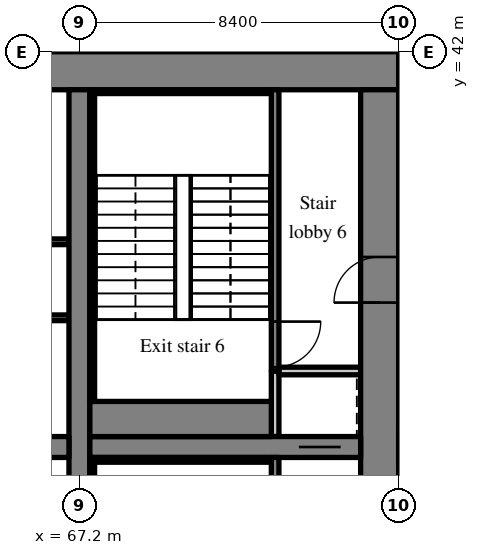
"""IFC4 building model, lengths in metres.
Left out: names, types, materials, properties, quantities, classifications, styles, units other than length and angle.
Written with IfcOpenShell. Run it as: python <this file> out.ifc"""

import sys

from ifc_helpers import new_model, si_unit, direction, frame, frame_2d, origin, place, context, subcontext, project, spatial, rectangle, extrude, source, transform, mapped, element, fill, save


model = new_model("IFC4")
c1 = context("Model", 3, precision=1e-05, world=origin(), true_north=direction((0.0, 1.0)))
c2 = subcontext(c1, "Body", "Model", "MODEL_VIEW")
j1 = project(units=[si_unit("LENGTHUNIT", "METRE"), si_unit("PLANEANGLEUNIT", "RADIAN")], contexts=[c1])
p1 = place(None, origin())
s1 = spatial("IfcSite", under=j1, at=p1, CompositionType="ELEMENT")
p2 = place(p1, origin())
s2 = spatial("IfcBuilding", under=s1, at=p2, CompositionType="ELEMENT")
p3 = place(p2, frame((0.0, 0.0, 81.0)))
s3 = spatial("IfcBuildingStorey", under=s2, at=p3, CompositionType="ELEMENT", Elevation=81.0)
m1 = source(origin(), c2, "Body", "SweptSolid", [
    extrude(rectangle(XDim=50.4, YDim=1.0, at=frame_2d((25.2, 0.0))), origin(), (0.0, 0.0, 1.0), 5.12),
])
p4 = place(p3, frame((25.2, 41.5, 0.0), z_axis=(0.0, 0.0, 1.0), x_axis=(1.0, 0.0, 0.0)))
e1 = element("IfcWall", 1, at=p4, inside=s3, PredefinedType="SHEAR", context=c2, shape_type="MappedRepresentation", body=[
    mapped(m1, transform((0.0, 0.0, 0.0), scale=1.0)),
])
m2 = source(origin(), c2, "Body", "SweptSolid", [
    extrude(rectangle(XDim=18.0, YDim=1.0, at=frame_2d((9.0, 0.0))), origin(), (0.0, 0.0, 1.0), 5.12),
])
p5 = place(p3, frame((75.1, 23.0, 0.0), z_axis=(0.0, 0.0, 1.0), x_axis=(0.0, 1.0, 0.0)))
e2 = element("IfcWall", 2, at=p5, inside=s3, PredefinedType="SHEAR", context=c2, shape_type="MappedRepresentation", body=[
    mapped(m2, transform((0.0, 0.0, 0.0), scale=1.0)),
])
m3 = source(origin(), c2, "Body", "SweptSolid", [
    extrude(rectangle(XDim=1.0, YDim=2.1, at=frame_2d((0.5, 1.05))), frame((0.0, 0.51, 0.0), z_axis=(0.0, -1.0, 0.0), x_axis=(1.0, 0.0, 0.0)), (0.0, 0.0, 1.0), 1.02),
])
p6 = place(p5, frame((2.5, 0.0, 0.0)))
e3 = element("IfcOpeningElement", 3, at=p6, cuts=e2, PredefinedType="OPENING", context=c2, shape_type="MappedRepresentation", body=[
    mapped(m3, transform((0.0, 0.0, 0.0), scale=1.0)),
])
m4 = source(origin(), c2, "Body", "SweptSolid", [
    extrude(rectangle(XDim=1.2, YDim=2.1, at=frame_2d((0.6, 1.05))), frame((0.0, 0.51, 0.0), z_axis=(0.0, -1.0, 0.0), x_axis=(1.0, 0.0, 0.0)), (0.0, 0.0, 1.0), 1.02),
])
p7 = place(p5, frame((12.4, 0.0, 0.0)))
e4 = element("IfcOpeningElement", 4, at=p7, cuts=e2, PredefinedType="OPENING", context=c2, shape_type="MappedRepresentation", body=[
    mapped(m4, transform((0.0, 0.0, 0.0), scale=1.0)),
])
m5 = source(origin(), c2, "Body", "SweptSolid", [
    extrude(rectangle(XDim=18.0, YDim=0.55, at=frame_2d((9.0, 0.0))), origin(), (0.0, 0.0, 1.0), 5.12),
])
p8 = place(p3, frame((67.2, 23.0, 0.0), z_axis=(0.0, 0.0, 1.0), x_axis=(0.0, 1.0, 0.0)))
e5 = element("IfcWall", 5, at=p8, inside=s3, PredefinedType="SHEAR", context=c2, shape_type="MappedRepresentation", body=[
    mapped(m5, transform((0.0, 0.0, 0.0), scale=1.0)),
])
m6 = source(origin(), c2, "Body", "SweptSolid", [
    extrude(rectangle(XDim=16.25, YDim=0.55, at=frame_2d((8.125, 0.0))), origin(), (0.0, 0.0, 1.0), 5.12),
])
p9 = place(p3, frame((50.675, 31.6, 0.0), z_axis=(0.0, 0.0, 1.0), x_axis=(1.0, 0.0, 0.0)))
e6 = element("IfcWall", 6, at=p9, inside=s3, PredefinedType="SHEAR", context=c2, shape_type="MappedRepresentation", body=[
    mapped(m6, transform((0.0, 0.0, 0.0), scale=1.0)),
])
m7 = source(origin(), c2, "Body", "SweptSolid", [
    extrude(rectangle(XDim=1.0, YDim=2.1, at=frame_2d((0.5, 1.05))), frame((0.0, 0.285, 0.0), z_axis=(0.0, -1.0, 0.0), x_axis=(1.0, 0.0, 0.0)), (0.0, 0.0, 1.0), 0.57),
])
p10 = place(p9, frame((0.562, 0.0, 0.0)))
e7 = element("IfcOpeningElement", 7, at=p10, cuts=e6, PredefinedType="OPENING", context=c2, shape_type="MappedRepresentation", body=[
    mapped(m7, transform((0.0, 0.0, 0.0), scale=1.0)),
])
m8 = source(origin(), c2, "Body", "SweptSolid", [
    extrude(rectangle(XDim=7.125, YDim=0.55, at=frame_2d((3.562, 0.0))), origin(), (0.0, 0.0, 1.0), 5.12),
])
p11 = place(p3, frame((67.475, 31.6, 0.0), z_axis=(0.0, 0.0, 1.0), x_axis=(1.0, 0.0, 0.0)))
e8 = element("IfcWall", 8, at=p11, inside=s3, PredefinedType="SHEAR", context=c2, shape_type="MappedRepresentation", body=[
    mapped(m8, transform((0.0, 0.0, 0.0), scale=1.0)),
])
m9 = source(origin(), c2, "Body", "SweptSolid", [
    extrude(rectangle(XDim=1.1, YDim=2.1, at=frame_2d((0.55, 1.05))), frame((0.0, 0.285, 0.0), z_axis=(0.0, -1.0, 0.0), x_axis=(1.0, 0.0, 0.0)), (0.0, 0.0, 1.0), 0.57),
])
p12 = place(p11, frame((5.5, 0.0, 0.0)))
e9 = element("IfcOpeningElement", 9, at=p12, cuts=e8, PredefinedType="OPENING", context=c2, shape_type="MappedRepresentation", body=[
    mapped(m9, transform((0.0, 0.0, 0.0), scale=1.0)),
])
m10 = source(origin(), c2, "Body", "SweptSolid", [
    extrude(rectangle(XDim=14.125, YDim=0.15, at=frame_2d((7.062, 0.0))), origin(), (0.0, 0.0, 1.0), 5.12),
])
p13 = place(p3, frame((66.925, 35.0, 0.0), z_axis=(0.0, 0.0, 1.0), x_axis=(-1.0, 0.0, 0.0)))
e10 = element("IfcWall", 10, at=p13, inside=s3, PredefinedType="PARTITIONING", context=c2, shape_type="MappedRepresentation", body=[
    mapped(m10, transform((0.0, 0.0, 0.0), scale=1.0)),
])
m11 = source(origin(), c2, "Body", "SweptSolid", [
    extrude(rectangle(XDim=0.9, YDim=2.1, at=frame_2d((0.45, 1.05))), frame((0.0, 0.085, 0.0), z_axis=(0.0, -1.0, 0.0), x_axis=(1.0, 0.0, 0.0)), (0.0, 0.0, 1.0), 0.17),
])
p14 = place(p13, frame((3.414, 0.0, 0.0)))
e11 = element("IfcOpeningElement", 11, at=p14, cuts=e10, PredefinedType="OPENING", context=c2, shape_type="MappedRepresentation", body=[
    mapped(m11, transform((0.0, 0.0, 0.0), scale=1.0)),
])
p15 = place(p13, frame((10.439, 0.0, 0.0)))
e12 = element("IfcOpeningElement", 12, at=p15, cuts=e10, PredefinedType="OPENING", context=c2, shape_type="MappedRepresentation", body=[
    mapped(m11, transform((0.0, 0.0, 0.0), scale=1.0)),
])
m12 = source(origin(), c2, "Body", "SweptSolid", [
    extrude(rectangle(XDim=16.25, YDim=0.15, at=frame_2d((8.125, 0.0))), origin(), (0.0, 0.0, 1.0), 5.12),
])
p16 = place(p3, frame((66.925, 37.0, 0.0), z_axis=(0.0, 0.0, 1.0), x_axis=(-1.0, 0.0, 0.0)))
e13 = element("IfcWall", 13, at=p16, inside=s3, PredefinedType="PARTITIONING", context=c2, shape_type="MappedRepresentation", body=[
    mapped(m12, transform((0.0, 0.0, 0.0), scale=1.0)),
])
p17 = place(p16, frame((6.456, 0.0, 0.0)))
e14 = element("IfcOpeningElement", 14, at=p17, cuts=e13, PredefinedType="OPENING", context=c2, shape_type="MappedRepresentation", body=[
    mapped(m11, transform((0.0, 0.0, 0.0), scale=1.0)),
])
p18 = place(p16, frame((14.581, 0.0, 0.0)))
e15 = element("IfcOpeningElement", 15, at=p18, cuts=e13, PredefinedType="OPENING", context=c2, shape_type="MappedRepresentation", body=[
    mapped(m11, transform((0.0, 0.0, 0.0), scale=1.0)),
])
m13 = source(origin(), c2, "Body", "SweptSolid", [
    extrude(rectangle(XDim=8.325, YDim=0.2, at=frame_2d((4.163, 0.0))), origin(), (0.0, 0.0, 1.0), 5.12),
])
p19 = place(p3, frame((72.35, 23.0, 0.0), z_axis=(0.0, 0.0, 1.0), x_axis=(0.0, 1.0, 0.0)))
e16 = element("IfcWall", 16, at=p19, inside=s3, PredefinedType="SOLIDWALL", context=c2, shape_type="MappedRepresentation", body=[
    mapped(m13, transform((0.0, 0.0, 0.0), scale=1.0)),
])
m14 = source(origin(), c2, "Body", "SweptSolid", [
    extrude(rectangle(XDim=1.2, YDim=2.1, at=frame_2d((0.6, 1.05))), frame((0.0, 0.11, 0.0), z_axis=(0.0, -1.0, 0.0), x_axis=(1.0, 0.0, 0.0)), (0.0, 0.0, 1.0), 0.22),
])
p20 = place(p19, frame((0.6, 0.0, 0.0)))
e17 = element("IfcOpeningElement", 17, at=p20, cuts=e16, PredefinedType="OPENING", context=c2, shape_type="MappedRepresentation", body=[
    mapped(m14, transform((0.0, 0.0, 0.0), scale=1.0)),
])
m15 = source(origin(), c2, "Body", "SweptSolid", [
    extrude(rectangle(XDim=1.725, YDim=0.2, at=frame_2d((0.863, 0.0))), origin(), (0.0, 0.0, 1.0), 5.12),
])
p21 = place(p3, frame((72.35, 31.875, 0.0), z_axis=(0.0, 0.0, 1.0), x_axis=(0.0, 1.0, 0.0)))
e18 = element("IfcWall", 18, at=p21, inside=s3, PredefinedType="SOLIDWALL", context=c2, shape_type="MappedRepresentation", body=[
    mapped(m15, transform((0.0, 0.0, 0.0), scale=1.0)),
])
m16 = source(origin(), c2, "Body", "SweptSolid", [
    extrude(rectangle(XDim=2.15, YDim=0.2, at=frame_2d((1.075, 0.0))), origin(), (0.0, 0.0, 1.0), 5.12),
])
p22 = place(p3, frame((72.45, 33.6, 0.0), z_axis=(0.0, 0.0, 1.0), x_axis=(1.0, 0.0, 0.0)))
e19 = element("IfcWall", 19, at=p22, inside=s3, PredefinedType="SOLIDWALL", context=c2, shape_type="MappedRepresentation", body=[
    mapped(m16, transform((0.0, 0.0, 0.0), scale=1.0)),
])
m17 = source(origin(), c2, "Body", "SweptSolid", [
    extrude(rectangle(XDim=7.4, YDim=0.2, at=frame_2d((3.7, 0.0))), origin(), (0.0, 0.0, 1.0), 5.12),
])
p23 = place(p3, frame((72.35, 33.6, 0.0), z_axis=(0.0, 0.0, 1.0), x_axis=(0.0, 1.0, 0.0)))
e20 = element("IfcWall", 20, at=p23, inside=s3, PredefinedType="SOLIDWALL", context=c2, shape_type="MappedRepresentation", body=[
    mapped(m17, transform((0.0, 0.0, 0.0), scale=1.0)),
])
p24 = place(p23, frame((0.1, 0.0, 0.0)))
e21 = element("IfcOpeningElement", 21, at=p24, cuts=e20, PredefinedType="OPENING", context=c2, shape_type="MappedRepresentation", body=[
    mapped(m14, transform((0.0, 0.0, 0.0), scale=1.0)),
])
m18 = source(origin(), c2, "Body", "SweptSolid", [
    extrude(rectangle(XDim=4.775, YDim=0.125, at=frame_2d((2.387, 0.0))), origin(), (0.0, 0.0, 1.0), 5.12),
])
p25 = place(p3, frame((67.475, 31.262, 0.0), z_axis=(0.0, 0.0, 1.0), x_axis=(1.0, 0.0, 0.0)))
e22 = element("IfcWall", 22, at=p25, inside=s3, PredefinedType="SOLIDWALL", context=c2, shape_type="MappedRepresentation", body=[
    mapped(m18, transform((0.0, 0.0, 0.0), scale=1.0)),
])
m19 = source(origin(), c2, "Body", "SweptSolid", [
    extrude(rectangle(XDim=8.1, YDim=0.125, at=frame_2d((4.05, 0.0))), origin(), (0.0, 0.0, 1.0), 5.12),
])
p26 = place(p3, frame((67.537, 23.1, 0.0), z_axis=(0.0, 0.0, 1.0), x_axis=(0.0, 1.0, 0.0)))
e23 = element("IfcWall", 23, at=p26, inside=s3, PredefinedType="SOLIDWALL", context=c2, shape_type="MappedRepresentation", body=[
    mapped(m19, transform((0.0, 0.0, 0.0), scale=1.0)),
])
m20 = source(origin(), c2, "Body", "SweptSolid", [
    extrude(rectangle(XDim=4.775, YDim=0.1, at=frame_2d((2.387, 0.0))), origin(), (0.0, 0.0, 1.0), 5.12),
])
p27 = place(p3, frame((67.475, 40.95, 0.0), z_axis=(0.0, 0.0, 1.0), x_axis=(1.0, 0.0, 0.0)))
e24 = element("IfcWall", 24, at=p27, inside=s3, PredefinedType="SOLIDWALL", context=c2, shape_type="MappedRepresentation", body=[
    mapped(m20, transform((0.0, 0.0, 0.0), scale=1.0)),
])
m21 = source(origin(), c2, "Body", "SweptSolid", [
    extrude(rectangle(XDim=4.775, YDim=0.925, at=frame_2d((2.387, 0.0))), origin(), (0.0, 0.0, 1.0), 5.12),
])
p28 = place(p3, frame((67.475, 32.337, 0.0), z_axis=(0.0, 0.0, 1.0), x_axis=(1.0, 0.0, 0.0)))
e25 = element("IfcWall", 25, at=p28, inside=s3, PredefinedType="SOLIDWALL", context=c2, shape_type="MappedRepresentation", body=[
    mapped(m21, transform((0.0, 0.0, 0.0), scale=1.0)),
])
p29 = place(p3, frame((67.537, 32.8, 0.0), z_axis=(0.0, 0.0, 1.0), x_axis=(0.0, 1.0, 0.0)))
e26 = element("IfcWall", 26, at=p29, inside=s3, PredefinedType="SOLIDWALL", context=c2, shape_type="MappedRepresentation", body=[
    mapped(m19, transform((0.0, 0.0, 0.0), scale=1.0)),
])
m22 = source(origin(), c2, "Body", "SweptSolid", [
    extrude(rectangle(XDim=1.1, YDim=2.1, at=frame_2d((0.55, 1.05))), frame((0.0, 0.025, 0.0), z_axis=(0.0, -1.0, 0.0), x_axis=(1.0, 0.0, 0.0)), (0.0, 0.0, 1.0), 0.05),
])
p30 = place(p12, origin())
e27 = element("IfcDoor", 27, at=p30, inside=s3, OperationType="SLIDING_TO_LEFT", PredefinedType="DOOR", context=c2, shape_type="MappedRepresentation", body=[
    mapped(m22, transform((0.0, 0.0, 0.0), scale=1.0)),
])
fill(e9, e27)
m23 = source(origin(), c2, "Body", "SweptSolid", [
    extrude(rectangle(XDim=1.2, YDim=2.1, at=frame_2d((0.6, 1.05))), frame((0.0, 0.025, 0.0), z_axis=(0.0, -1.0, 0.0), x_axis=(1.0, 0.0, 0.0)), (0.0, 0.0, 1.0), 0.05),
])
p31 = place(p24, origin())
e28 = element("IfcDoor", 28, at=p31, inside=s3, OperationType="SINGLE_SWING_RIGHT", PredefinedType="DOOR", context=c2, shape_type="MappedRepresentation", body=[
    mapped(m23, transform((0.0, 0.0, 0.0), scale=1.0)),
])
fill(e21, e28)
p32 = place(p7, origin())
e29 = element("IfcDoor", 29, at=p32, inside=s3, OperationType="SINGLE_SWING_LEFT", PredefinedType="DOOR", context=c2, shape_type="MappedRepresentation", body=[
    mapped(m23, transform((0.0, 0.0, 0.0), scale=1.0)),
])
fill(e4, e29)
save(model, sys.argv[1])
